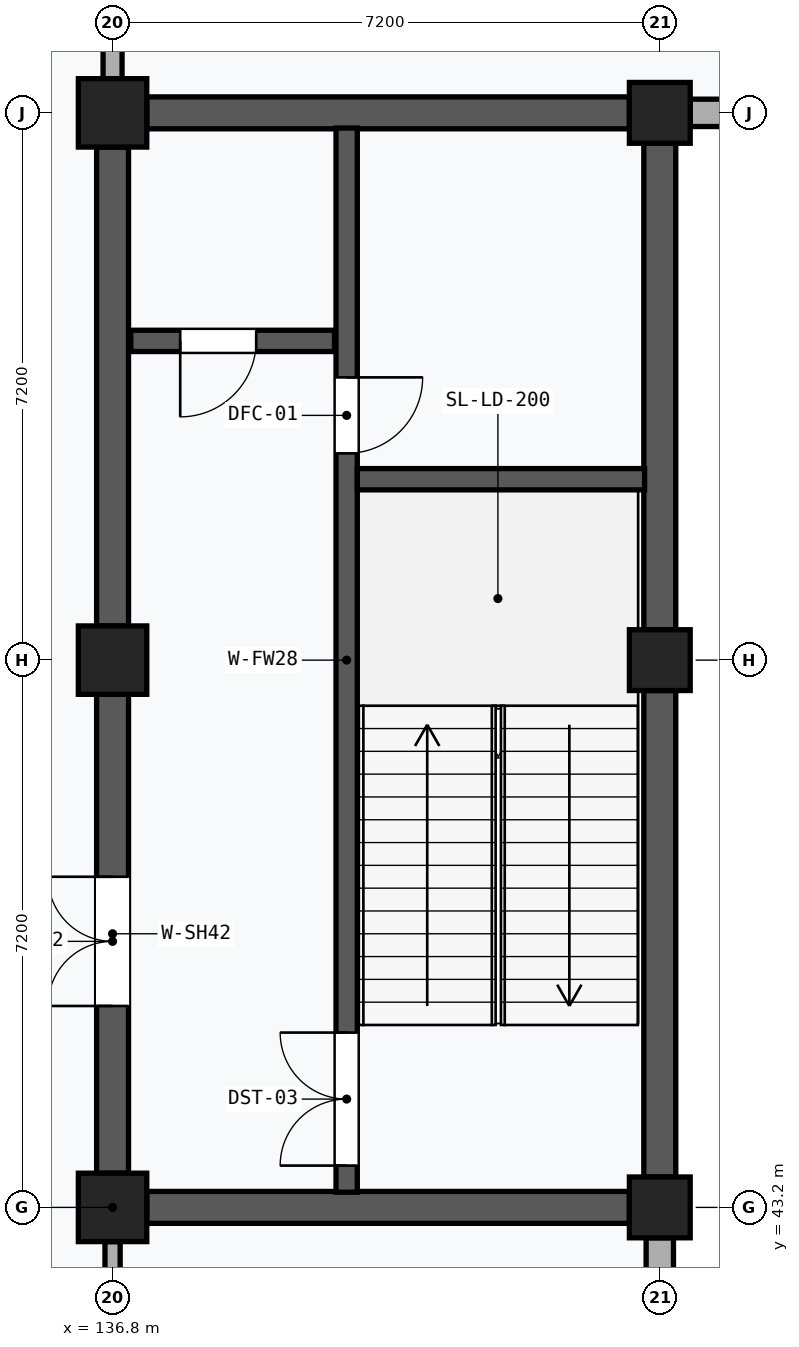
"""IFC4 building model, lengths in metres.
Left out: names, types, materials, properties, quantities, classifications, styles, units other than length and angle.
Written with IfcOpenShell. Run it as: python <this file> out.ifc"""

import sys

from ifc_helpers import new_model, si_unit, direction, frame, frame_2d, origin, origin_2d, place, context, subcontext, project, spatial, rectangle, extrude, element, fill, save


model = new_model("IFC4")
c1 = context("Model", 3, precision=1e-05, world=origin(), true_north=direction((0.0, 1.0)))
c2 = subcontext(c1, "Body", "Model", "MODEL_VIEW")
j1 = project(units=[si_unit("LENGTHUNIT", "METRE"), si_unit("PLANEANGLEUNIT", "RADIAN")], contexts=[c1])
p1 = place(None, origin())
s1 = spatial("IfcSite", under=j1, at=p1, CompositionType="ELEMENT")
p2 = place(p1, origin())
s2 = spatial("IfcBuilding", under=s1, at=p2, CompositionType="ELEMENT")
p3 = place(p2, origin())
s3 = spatial("IfcBuildingStorey", under=s2, at=p3, CompositionType="ELEMENT", Elevation=0.0)
for number, where, z_axis, x_axis in (
    (1, (136.8, 43.2, 0.0), (0.0, 0.0, 1.0), (1.0, 0.0, 0.0)),
    (2, (136.8, 50.4, 0.0), (0.0, 0.0, 1.0), (1.0, 0.0, 0.0)),
    (3, (136.8, 57.6, 0.0), (0.0, 0.0, 1.0), (1.0, 0.0, 0.0)),
):
    element("IfcColumn", number, at=place(p3, frame(where, z_axis=z_axis, x_axis=x_axis)), inside=s3, PredefinedType="COLUMN", context=c2, shape_type="SweptSolid", body=[
        extrude(rectangle(XDim=0.9, YDim=0.9, at=origin_2d()), origin(), (0.0, 0.0, 1.0), 4.8),
    ])
for number, where, z_axis, x_axis in (
    (4, (144.0, 43.2, 0.0), (0.0, 0.0, 1.0), (1.0, 0.0, 0.0)),
    (5, (144.0, 50.4, 0.0), (0.0, 0.0, 1.0), (1.0, 0.0, 0.0)),
    (6, (144.0, 57.6, 0.0), (0.0, 0.0, 1.0), (1.0, 0.0, 0.0)),
):
    element("IfcColumn", number, at=place(p3, frame(where, z_axis=z_axis, x_axis=x_axis)), inside=s3, PredefinedType="COLUMN", context=c2, shape_type="SweptSolid", body=[
        extrude(rectangle(XDim=0.8, YDim=0.8, at=origin_2d()), origin(), (0.0, 0.0, 1.0), 4.8),
    ])
p4 = place(p3, frame((144.0, 36.375, 0.0), z_axis=(0.0, 0.0, 1.0), x_axis=(0.0, 1.0, 0.0)))
e7 = element("IfcWall", 7, at=p4, inside=s3, PredefinedType="SOLIDWALL", context=c2, shape_type="SweptSolid", body=[
    extrude(rectangle(XDim=6.425, YDim=0.36, at=frame_2d((3.212, 0.0))), origin(), (0.0, 0.0, 1.0), 3.89),
])
p5 = place(p4, frame((2.113, 0.0, 0.9)))
e8 = element("IfcOpeningElement", 8, at=p5, cuts=e7, PredefinedType="OPENING", context=c2, shape_type="SweptSolid", body=[
    extrude(rectangle(XDim=2.2, YDim=1.8, at=frame_2d((1.1, 0.9))), frame((0.0, 0.192, 0.0), z_axis=(0.0, -1.0, 0.0), x_axis=(1.0, 0.0, 0.0)), (0.0, 0.0, 1.0), 0.384),
])
p6 = place(p3, frame((144.4, 57.6, 0.0), z_axis=(0.0, 0.0, 1.0), x_axis=(1.0, 0.0, 0.0)))
e9 = element("IfcWall", 9, at=p6, inside=s3, PredefinedType="SOLIDWALL", context=c2, shape_type="SweptSolid", body=[
    extrude(rectangle(XDim=6.4, YDim=0.36, at=frame_2d((3.2, 0.0))), origin(), (0.0, 0.0, 1.0), 4.47),
])
p7 = place(p6, frame((1.8, 0.0, 0.9)))
e10 = element("IfcOpeningElement", 10, at=p7, cuts=e9, PredefinedType="OPENING", context=c2, shape_type="SweptSolid", body=[
    extrude(rectangle(XDim=2.8, YDim=1.8, at=frame_2d((1.4, 0.9))), frame((0.0, 0.192, 0.0), z_axis=(0.0, -1.0, 0.0), x_axis=(1.0, 0.0, 0.0)), (0.0, 0.0, 1.0), 0.384),
])
p8 = place(p3, frame((136.8, 43.65, 0.0), z_axis=(0.0, 0.0, 1.0), x_axis=(0.0, 1.0, 0.0)))
e11 = element("IfcWall", 11, at=p8, inside=s3, PredefinedType="SHEAR", context=c2, shape_type="SweptSolid", body=[
    extrude(rectangle(XDim=6.3, YDim=0.42, at=frame_2d((3.15, 0.0))), origin(), (0.0, 0.0, 1.0), 3.62),
])
p9 = place(p8, frame((2.2, 0.0, 0.0)))
e12 = element("IfcOpeningElement", 12, at=p9, cuts=e11, PredefinedType="OPENING", context=c2, shape_type="SweptSolid", body=[
    extrude(rectangle(XDim=1.7, YDim=2.25, at=frame_2d((0.85, 1.125))), frame((0.0, 0.222, 0.0), z_axis=(0.0, -1.0, 0.0), x_axis=(1.0, 0.0, 0.0)), (0.0, 0.0, 1.0), 0.444),
])
p10 = place(p3, frame((136.8, 50.85, 0.0), z_axis=(0.0, 0.0, 1.0), x_axis=(0.0, 1.0, 0.0)))
e13 = element("IfcWall", 13, at=p10, inside=s3, PredefinedType="SHEAR", context=c2, shape_type="SweptSolid", body=[
    extrude(rectangle(XDim=6.3, YDim=0.42, at=frame_2d((3.15, 0.0))), origin(), (0.0, 0.0, 1.0), 3.62),
])
for number, where, z_axis, x_axis in (
    (14, (144.0, 43.6, 0.0), (0.0, 0.0, 1.0), (0.0, 1.0, 0.0)),
    (15, (144.0, 50.8, 0.0), (0.0, 0.0, 1.0), (0.0, 1.0, 0.0)),
):
    element("IfcWall", number, at=place(p3, frame(where, z_axis=z_axis, x_axis=x_axis)), inside=s3, PredefinedType="SHEAR", context=c2, shape_type="SweptSolid", body=[
        extrude(rectangle(XDim=6.4, YDim=0.42, at=frame_2d((3.2, 0.0))), origin(), (0.0, 0.0, 1.0), 3.89),
    ])
for number, where, z_axis, x_axis in (
    (16, (137.25, 43.2, 0.0), (0.0, 0.0, 1.0), (1.0, 0.0, 0.0)),
    (17, (137.25, 57.6, 0.0), (0.0, 0.0, 1.0), (1.0, 0.0, 0.0)),
):
    element("IfcWall", number, at=place(p3, frame(where, z_axis=z_axis, x_axis=x_axis)), inside=s3, PredefinedType="SHEAR", context=c2, shape_type="SweptSolid", body=[
        extrude(rectangle(XDim=6.35, YDim=0.42, at=frame_2d((3.175, 0.0))), origin(), (0.0, 0.0, 1.0), 3.62),
    ])
p11 = place(p3, frame((139.88, 43.4, 0.0), z_axis=(0.0, 0.0, 1.0), x_axis=(0.0, 1.0, 0.0)))
e18 = element("IfcWall", 18, at=p11, inside=s3, PredefinedType="SHEAR", context=c2, shape_type="SweptSolid", body=[
    extrude(rectangle(XDim=14.0, YDim=0.28, at=frame_2d((7.0, 0.0))), origin(), (0.0, 0.0, 1.0), 4.52),
])
p12 = place(p11, frame((0.35, 0.0, 0.0)))
e19 = element("IfcOpeningElement", 19, at=p12, cuts=e18, PredefinedType="OPENING", context=c2, shape_type="SweptSolid", body=[
    extrude(rectangle(XDim=1.75, YDim=2.15, at=frame_2d((0.875, 1.075))), frame((0.0, 0.152, 0.0), z_axis=(0.0, -1.0, 0.0), x_axis=(1.0, 0.0, 0.0)), (0.0, 0.0, 1.0), 0.304),
])
p13 = place(p11, frame((9.72, 0.0, 0.0)))
e20 = element("IfcOpeningElement", 20, at=p13, cuts=e18, PredefinedType="OPENING", context=c2, shape_type="SweptSolid", body=[
    extrude(rectangle(XDim=1.0, YDim=2.15, at=frame_2d((0.5, 1.075))), frame((0.0, 0.152, 0.0), z_axis=(0.0, -1.0, 0.0), x_axis=(1.0, 0.0, 0.0)), (0.0, 0.0, 1.0), 0.304),
])
p14 = place(p3, frame((140.02, 52.78, 0.0), z_axis=(0.0, 0.0, 1.0), x_axis=(1.0, 0.0, 0.0)))
e21 = element("IfcWall", 21, at=p14, inside=s3, PredefinedType="SHEAR", context=c2, shape_type="SweptSolid", body=[
    extrude(rectangle(XDim=3.78, YDim=0.28, at=frame_2d((1.89, 0.0))), origin(), (0.0, 0.0, 1.0), 4.52),
])
p15 = place(p3, frame((137.04, 54.6, 0.0), z_axis=(0.0, 0.0, 1.0), x_axis=(1.0, 0.0, 0.0)))
e22 = element("IfcWall", 22, at=p15, inside=s3, PredefinedType="SHEAR", context=c2, shape_type="SweptSolid", body=[
    extrude(rectangle(XDim=2.68, YDim=0.28, at=frame_2d((1.34, 0.0))), origin(), (0.0, 0.0, 1.0), 4.52),
])
p16 = place(p15, frame((0.65, 0.0, 0.0)))
e23 = element("IfcOpeningElement", 23, at=p16, cuts=e22, PredefinedType="OPENING", context=c2, shape_type="SweptSolid", body=[
    extrude(rectangle(XDim=1.0, YDim=2.15, at=frame_2d((0.5, 1.075))), frame((0.0, 0.152, 0.0), z_axis=(0.0, -1.0, 0.0), x_axis=(1.0, 0.0, 0.0)), (0.0, 0.0, 1.0), 0.304),
])
p17 = place(p3, frame((136.8, 58.05, 0.0), z_axis=(0.0, 0.0, 1.0), x_axis=(0.0, 1.0, 0.0)))
e24 = element("IfcWall", 24, at=p17, inside=s3, PredefinedType="PARTITIONING", context=c2, shape_type="SweptSolid", body=[
    extrude(rectangle(XDim=6.3, YDim=0.25, at=frame_2d((3.15, 0.0))), origin(), (0.0, 0.0, 1.0), 3.62),
])
p18 = place(p17, frame((2.2, 0.0, 0.0)))
e25 = element("IfcOpeningElement", 25, at=p18, cuts=e24, PredefinedType="OPENING", context=c2, shape_type="SweptSolid", body=[
    extrude(rectangle(XDim=1.9, YDim=2.35, at=frame_2d((0.95, 1.175))), frame((0.0, 0.137, 0.0), z_axis=(0.0, -1.0, 0.0), x_axis=(1.0, 0.0, 0.0)), (0.0, 0.0, 1.0), 0.274),
])
p19 = place(p3, frame((136.8, 36.45, 0.0), z_axis=(0.0, 0.0, 1.0), x_axis=(0.0, 1.0, 0.0)))
e26 = element("IfcWall", 26, at=p19, inside=s3, PredefinedType="PARTITIONING", context=c2, shape_type="SweptSolid", body=[
    extrude(rectangle(XDim=6.3, YDim=0.2, at=frame_2d((3.15, 0.0))), origin(), (0.0, 0.0, 1.0), 3.62),
])
p20 = place(p9, origin())
e27 = element("IfcDoor", 27, at=p20, inside=s3, OperationType="DOUBLE_DOOR_SINGLE_SWING", PredefinedType="DOOR", context=c2, shape_type="SweptSolid", body=[
    extrude(rectangle(XDim=1.7, YDim=2.25, at=frame_2d((0.85, 1.125))), frame((0.0, 0.025, 0.0), z_axis=(0.0, -1.0, 0.0), x_axis=(1.0, 0.0, 0.0)), (0.0, 0.0, 1.0), 0.05),
])
fill(e12, e27)
p21 = place(p12, origin())
e28 = element("IfcDoor", 28, at=p21, inside=s3, OperationType="DOUBLE_DOOR_SINGLE_SWING", PredefinedType="DOOR", context=c2, shape_type="SweptSolid", body=[
    extrude(rectangle(XDim=1.75, YDim=2.15, at=frame_2d((0.875, 1.075))), frame((0.0, 0.025, 0.0), z_axis=(0.0, -1.0, 0.0), x_axis=(1.0, 0.0, 0.0)), (0.0, 0.0, 1.0), 0.05),
])
fill(e19, e28)
p22 = place(p13, frame((1.0, 0.0, 0.0), z_axis=(0.0, 0.0, 1.0), x_axis=(-1.0, 0.0, 0.0)))
e29 = element("IfcDoor", 29, at=p22, inside=s3, OperationType="SINGLE_SWING_LEFT", PredefinedType="DOOR", context=c2, shape_type="SweptSolid", body=[
    extrude(rectangle(XDim=1.0, YDim=2.15, at=frame_2d((0.5, 1.075))), frame((0.0, 0.025, 0.0), z_axis=(0.0, -1.0, 0.0), x_axis=(1.0, 0.0, 0.0)), (0.0, 0.0, 1.0), 0.05),
])
fill(e20, e29)
p23 = place(p16, frame((1.0, 0.0, 0.0), z_axis=(0.0, 0.0, 1.0), x_axis=(-1.0, 0.0, 0.0)))
e30 = element("IfcDoor", 30, at=p23, inside=s3, OperationType="SINGLE_SWING_RIGHT", PredefinedType="DOOR", context=c2, shape_type="SweptSolid", body=[
    extrude(rectangle(XDim=1.0, YDim=2.15, at=frame_2d((0.5, 1.075))), frame((0.0, 0.025, 0.0), z_axis=(0.0, -1.0, 0.0), x_axis=(1.0, 0.0, 0.0)), (0.0, 0.0, 1.0), 0.05),
])
fill(e23, e30)
save(model, sys.argv[1])
